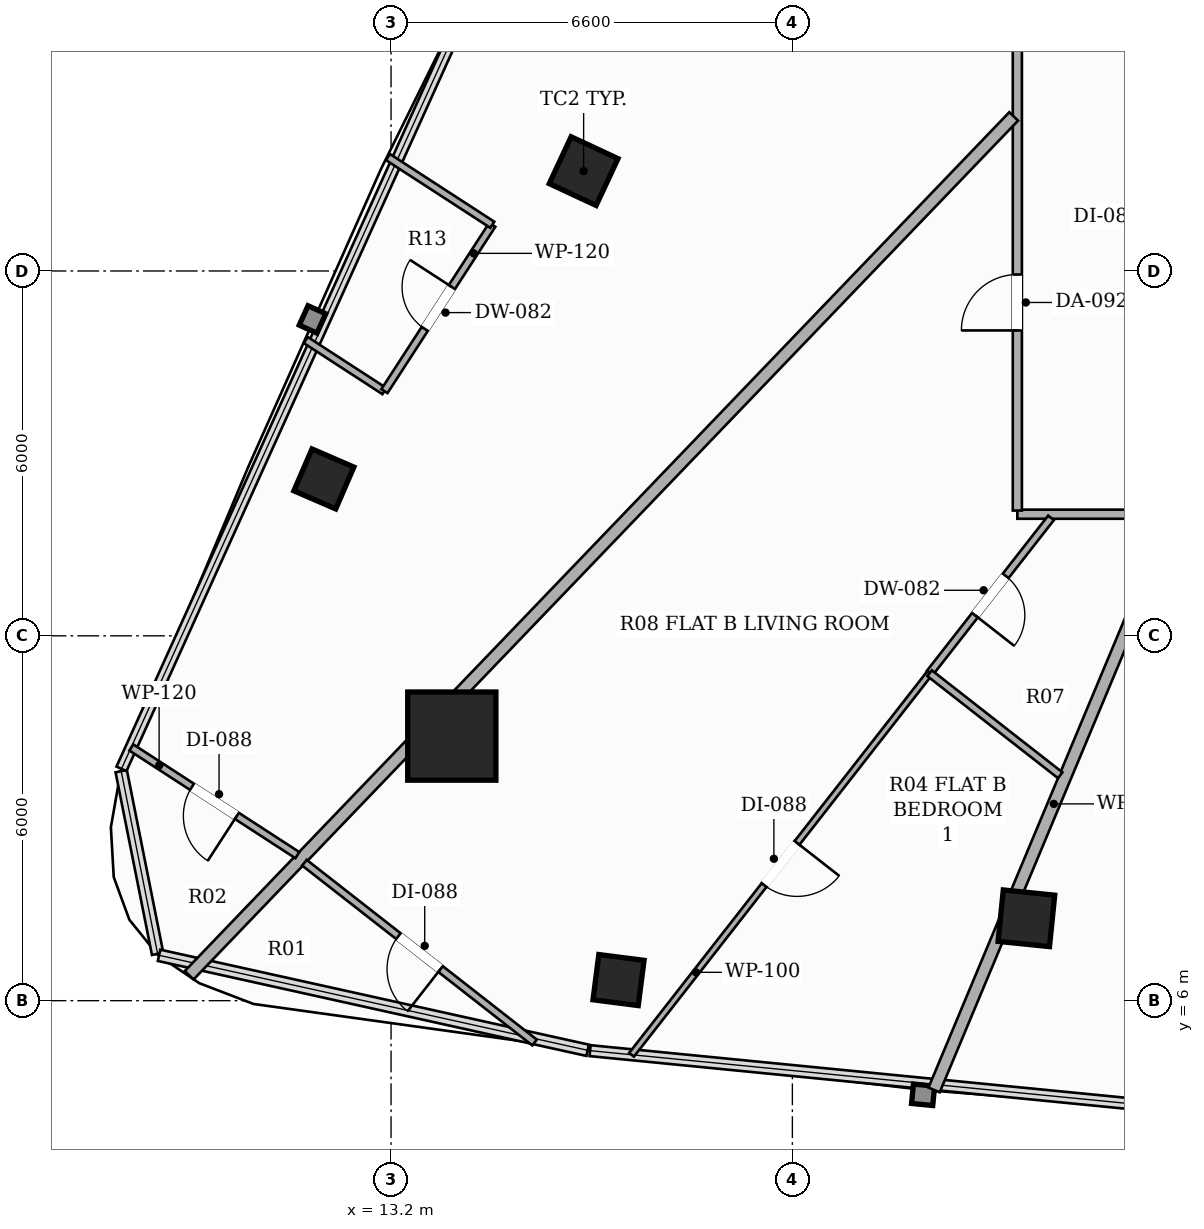
"""IFC4 building model, lengths in metres.
Left out: names, types, materials, properties, quantities, classifications, styles, units other than length and angle.
Written with IfcOpenShell. Run it as: python <this file> out.ifc"""

import sys

from ifc_helpers import new_model, si_unit, direction, frame, frame_2d, origin, origin_2d, place, context, subcontext, project, spatial, rectangle, hollow_rectangle, extrude, element, fill, save


model = new_model("IFC4")
c1 = context("Model", 3, precision=1e-05, world=origin(), true_north=direction((0.0, 1.0)))
c2 = subcontext(c1, "Body", "Model", "MODEL_VIEW")
j1 = project(units=[si_unit("LENGTHUNIT", "METRE"), si_unit("PLANEANGLEUNIT", "RADIAN")], contexts=[c1])
p1 = place(None, origin())
s1 = spatial("IfcSite", under=j1, at=p1, CompositionType="ELEMENT")
p2 = place(p1, origin())
s2 = spatial("IfcBuilding", under=s1, at=p2, CompositionType="ELEMENT")
p3 = place(p2, frame((0.0, 0.0, 180.35)))
s3 = spatial("IfcBuildingStorey", under=s2, at=p3, CompositionType="ELEMENT", Elevation=180.35)
p4 = place(p3, frame((14.199, 10.351, 0.0), z_axis=(0.0, 0.0, 1.0), x_axis=(1.0, 0.0, 0.0)))
e1 = element("IfcColumn", 1, at=p4, inside=s3, PredefinedType="COLUMN", context=c2, shape_type="SweptSolid", body=[
    extrude(hollow_rectangle(XDim=1.45, YDim=1.45, WallThickness=0.045, at=origin_2d()), origin(), (0.0, 0.0, 1.0), 3.3),
])
for number, where, z_axis, x_axis in (
    (2, (16.367, 19.642, 0.0), (0.0, 0.0, 1.0), (0.423, 0.906, 0.0)),
    (3, (23.649, 7.355, 0.0), (0.0, 0.0, 1.0), (-0.995, 0.101, 0.0)),
):
    element("IfcColumn", number, at=place(p3, frame(where, z_axis=z_axis, x_axis=x_axis)), inside=s3, PredefinedType="COLUMN", context=c2, shape_type="SweptSolid", body=[
        extrude(hollow_rectangle(XDim=0.85, YDim=0.85, WallThickness=0.028, at=origin_2d()), origin(), (0.0, 0.0, 1.0), 3.3),
    ])
for number, where, z_axis, x_axis in (
    (4, (12.095, 14.58, 0.0), (0.0, 0.0, 1.0), (0.397, 0.918, 0.0)),
    (5, (16.941, 6.339, 0.0), (0.0, 0.0, 1.0), (-0.992, 0.127, 0.0)),
):
    element("IfcColumn", number, at=place(p3, frame(where, z_axis=z_axis, x_axis=x_axis)), inside=s3, PredefinedType="COLUMN", context=c2, shape_type="SweptSolid", body=[
        extrude(hollow_rectangle(XDim=0.75, YDim=0.75, WallThickness=0.025, at=origin_2d()), origin(), (0.0, 0.0, 1.0), 3.3),
    ])
p5 = place(p3, frame((26.09, 14.0, 0.0), z_axis=(0.0, 0.0, 1.0), x_axis=(-1.0, 0.0, 0.0)))
e6 = element("IfcWall", 6, at=p5, inside=s3, PredefinedType="PARTITIONING", context=c2, shape_type="SweptSolid", body=[
    extrude(rectangle(XDim=2.59, YDim=0.15, at=frame_2d((1.295, 0.0))), origin(), (0.0, 0.0, 1.0), 2.721),
])
p6 = place(p3, frame((23.5, 14.06, 0.0), z_axis=(0.0, 0.0, 1.0), x_axis=(0.0, 1.0, 0.0)))
e7 = element("IfcWall", 7, at=p6, inside=s3, PredefinedType="PARTITIONING", context=c2, shape_type="SweptSolid", body=[
    extrude(rectangle(XDim=23.181, YDim=0.15, at=frame_2d((11.59, 0.0))), origin(), (0.0, 0.0, 1.0), 2.413),
])
p7 = place(p6, frame((14.184, 0.0, 0.0)))
e8 = element("IfcOpeningElement", 8, at=p7, cuts=e7, PredefinedType="OPENING", context=c2, shape_type="SweptSolid", body=[
    extrude(rectangle(XDim=0.92, YDim=2.15, at=frame_2d((0.46, 1.075))), frame((0.0, 0.085, 0.0), z_axis=(0.0, -1.0, 0.0), x_axis=(1.0, 0.0, 0.0)), (0.0, 0.0, 1.0), 0.17),
])
p8 = place(p6, frame((2.962, 0.0, 0.0)))
e9 = element("IfcOpeningElement", 9, at=p8, cuts=e7, PredefinedType="OPENING", context=c2, shape_type="SweptSolid", body=[
    extrude(rectangle(XDim=0.92, YDim=2.15, at=frame_2d((0.46, 1.075))), frame((0.0, 0.085, 0.0), z_axis=(0.0, -1.0, 0.0), x_axis=(1.0, 0.0, 0.0)), (0.0, 0.0, 1.0), 0.17),
])
p9 = place(p3, frame((22.131, 4.532, 0.0), z_axis=(0.0, 0.0, 1.0), x_axis=(0.38611914038, 0.922448919687, 0.0)))
e10 = element("IfcWall", 10, at=p9, inside=s3, PredefinedType="PARTITIONING", context=c2, shape_type="SweptSolid", body=[
    extrude(rectangle(XDim=10.199, YDim=0.2, at=frame_2d((5.1, 0.0))), origin(), (0.0, 0.0, 1.0), 2.413),
])
p10 = place(p3, frame((23.44, 20.542, 0.0), z_axis=(0.0, 0.0, 1.0), x_axis=(-0.692558302481, -0.721361904777, 0.0)))
e11 = element("IfcWall", 11, at=p10, inside=s3, PredefinedType="PARTITIONING", context=c2, shape_type="SweptSolid", body=[
    extrude(rectangle(XDim=19.58, YDim=0.2, at=frame_2d((9.79, 0.0))), origin(), (0.0, 0.0, 1.0), 2.413),
])
p11 = place(p3, frame((11.797, 16.864, 0.0), z_axis=(0.0, 0.0, 1.0), x_axis=(0.838732745172, -0.544543278516, 0.0)))
e12 = element("IfcWall", 12, at=p11, inside=s3, PredefinedType="PARTITIONING", context=c2, shape_type="SweptSolid", body=[
    extrude(rectangle(XDim=1.543, YDim=0.12, at=frame_2d((0.771, 0.0))), origin(), (0.0, 0.0, 1.0), 2.413),
])
p12 = place(p3, frame((13.091, 16.024, 0.0), z_axis=(0.0, 0.0, 1.0), x_axis=(0.544011633561, 0.839077673729, 0.0)))
e13 = element("IfcWall", 13, at=p12, inside=s3, PredefinedType="PARTITIONING", context=c2, shape_type="SweptSolid", body=[
    extrude(rectangle(XDim=3.261, YDim=0.12, at=frame_2d((1.63, 0.0))), origin(), (0.0, 0.0, 1.0), 2.413),
])
p13 = place(p12, frame((1.22, 0.0, 0.0)))
e14 = element("IfcOpeningElement", 14, at=p13, cuts=e13, PredefinedType="OPENING", context=c2, shape_type="SweptSolid", body=[
    extrude(rectangle(XDim=0.82, YDim=2.1, at=frame_2d((0.41, 1.05))), frame((0.0, 0.07, 0.0), z_axis=(0.0, -1.0, 0.0), x_axis=(1.0, 0.0, 0.0)), (0.0, 0.0, 1.0), 0.14),
])
p14 = place(p3, frame((14.865, 18.76, 0.0), z_axis=(0.0, 0.0, 1.0), x_axis=(-0.838903880254, 0.544279596986, 0.0)))
e15 = element("IfcWall", 15, at=p14, inside=s3, PredefinedType="PARTITIONING", context=c2, shape_type="SweptSolid", body=[
    extrude(rectangle(XDim=2.047, YDim=0.12, at=frame_2d((1.023, 0.0))), origin(), (0.0, 0.0, 1.0), 3.06),
])
p15 = place(p3, frame((11.659, 8.393, 0.0), z_axis=(0.0, 0.0, 1.0), x_axis=(-0.838933513053, 0.544233920916, 0.0)))
e16 = element("IfcWall", 16, at=p15, inside=s3, PredefinedType="PARTITIONING", context=c2, shape_type="SweptSolid", body=[
    extrude(rectangle(XDim=3.254, YDim=0.12, at=frame_2d((1.627, 0.0))), origin(), (0.0, 0.0, 1.0), 3.06),
])
p16 = place(p15, frame((1.186, 0.0, 0.0)))
e17 = element("IfcOpeningElement", 17, at=p16, cuts=e16, PredefinedType="OPENING", context=c2, shape_type="SweptSolid", body=[
    extrude(rectangle(XDim=0.88, YDim=2.1, at=frame_2d((0.44, 1.05))), frame((0.0, 0.07, 0.0), z_axis=(0.0, -1.0, 0.0), x_axis=(1.0, 0.0, 0.0)), (0.0, 0.0, 1.0), 0.14),
])
p17 = place(p3, frame((24.054, 13.94, 0.0), z_axis=(0.0, 0.0, 1.0), x_axis=(-0.615841255229, -0.787870261121, 0.0)))
e18 = element("IfcWall", 18, at=p17, inside=s3, PredefinedType="PARTITIONING", context=c2, shape_type="SweptSolid", body=[
    extrude(rectangle(XDim=3.243, YDim=0.12, at=frame_2d((1.622, 0.0))), origin(), (0.0, 0.0, 1.0), 2.721),
])
p18 = place(p17, frame((1.211, 0.0, 0.0)))
e19 = element("IfcOpeningElement", 19, at=p18, cuts=e18, PredefinedType="OPENING", context=c2, shape_type="SweptSolid", body=[
    extrude(rectangle(XDim=0.82, YDim=2.1, at=frame_2d((0.41, 1.05))), frame((0.0, 0.07, 0.0), z_axis=(0.0, -1.0, 0.0), x_axis=(1.0, 0.0, 0.0)), (0.0, 0.0, 1.0), 0.14),
])
p19 = place(p3, frame((15.56, 5.312, 0.0), z_axis=(0.0, 0.0, 1.0), x_axis=(-0.788036702969, 0.615628260214, 0.0)))
e20 = element("IfcWall", 20, at=p19, inside=s3, PredefinedType="PARTITIONING", context=c2, shape_type="SweptSolid", body=[
    extrude(rectangle(XDim=4.803, YDim=0.12, at=frame_2d((2.402, 0.0))), origin(), (0.0, 0.0, 1.0), 3.06),
])
p20 = place(p19, frame((1.962, 0.0, 0.0)))
e21 = element("IfcOpeningElement", 21, at=p20, cuts=e20, PredefinedType="OPENING", context=c2, shape_type="SweptSolid", body=[
    extrude(rectangle(XDim=0.88, YDim=2.1, at=frame_2d((0.44, 1.05))), frame((0.0, 0.07, 0.0), z_axis=(0.0, -1.0, 0.0), x_axis=(1.0, 0.0, 0.0)), (0.0, 0.0, 1.0), 0.14),
])
p21 = place(p3, frame((22.057, 11.385, 0.0), z_axis=(0.0, 0.0, 1.0), x_axis=(-0.61561191154, -0.78804947457, 0.0)))
e22 = element("IfcWall", 22, at=p21, inside=s3, PredefinedType="PARTITIONING", context=c2, shape_type="SweptSolid", body=[
    extrude(rectangle(XDim=7.963, YDim=0.1, at=frame_2d((3.981, 0.0))), origin(), (0.0, 0.0, 1.0), 2.413),
])
p22 = place(p21, frame((3.541, 0.0, 0.0)))
e23 = element("IfcOpeningElement", 23, at=p22, cuts=e22, PredefinedType="OPENING", context=c2, shape_type="SweptSolid", body=[
    extrude(rectangle(XDim=0.88, YDim=2.1, at=frame_2d((0.44, 1.05))), frame((0.0, 0.06, 0.0), z_axis=(0.0, -1.0, 0.0), x_axis=(1.0, 0.0, 0.0)), (0.0, 0.0, 1.0), 0.12),
])
p23 = place(p3, frame((24.205, 9.707, 0.0), z_axis=(0.0, 0.0, 1.0), x_axis=(-0.788077327334, 0.615576255343, 0.0)))
e24 = element("IfcWall", 24, at=p23, inside=s3, PredefinedType="PARTITIONING", context=c2, shape_type="SweptSolid", body=[
    extrude(rectangle(XDim=2.726, YDim=0.12, at=frame_2d((1.363, 0.0))), origin(), (0.0, 0.0, 1.0), 2.721),
])
p24 = place(p13, origin())
e25 = element("IfcDoor", 25, at=p24, inside=s3, OperationType="SINGLE_SWING_RIGHT", PredefinedType="DOOR", context=c2, shape_type="SweptSolid", body=[
    extrude(rectangle(XDim=0.82, YDim=2.1, at=frame_2d((0.41, 1.05))), frame((0.0, 0.025, 0.0), z_axis=(0.0, -1.0, 0.0), x_axis=(1.0, 0.0, 0.0)), (0.0, 0.0, 1.0), 0.05),
])
fill(e14, e25)
p25 = place(p16, origin())
e26 = element("IfcDoor", 26, at=p25, inside=s3, OperationType="SINGLE_SWING_LEFT", PredefinedType="DOOR", context=c2, shape_type="SweptSolid", body=[
    extrude(rectangle(XDim=0.88, YDim=2.1, at=frame_2d((0.44, 1.05))), frame((0.0, 0.025, 0.0), z_axis=(0.0, -1.0, 0.0), x_axis=(1.0, 0.0, 0.0)), (0.0, 0.0, 1.0), 0.05),
])
fill(e17, e26)
p26 = place(p8, origin())
e27 = element("IfcDoor", 27, at=p26, inside=s3, OperationType="SINGLE_SWING_LEFT", PredefinedType="DOOR", context=c2, shape_type="SweptSolid", body=[
    extrude(rectangle(XDim=0.92, YDim=2.15, at=frame_2d((0.46, 1.075))), frame((0.0, 0.025, 0.0), z_axis=(0.0, -1.0, 0.0), x_axis=(1.0, 0.0, 0.0)), (0.0, 0.0, 1.0), 0.05),
])
fill(e9, e27)
p27 = place(p18, origin())
e28 = element("IfcDoor", 28, at=p27, inside=s3, OperationType="SINGLE_SWING_RIGHT", PredefinedType="DOOR", context=c2, shape_type="SweptSolid", body=[
    extrude(rectangle(XDim=0.82, YDim=2.1, at=frame_2d((0.41, 1.05))), frame((0.0, 0.025, 0.0), z_axis=(0.0, -1.0, 0.0), x_axis=(1.0, 0.0, 0.0)), (0.0, 0.0, 1.0), 0.05),
])
fill(e19, e28)
p28 = place(p20, origin())
e29 = element("IfcDoor", 29, at=p28, inside=s3, OperationType="SINGLE_SWING_LEFT", PredefinedType="DOOR", context=c2, shape_type="SweptSolid", body=[
    extrude(rectangle(XDim=0.88, YDim=2.1, at=frame_2d((0.44, 1.05))), frame((0.0, 0.025, 0.0), z_axis=(0.0, -1.0, 0.0), x_axis=(1.0, 0.0, 0.0)), (0.0, 0.0, 1.0), 0.05),
])
fill(e21, e29)
p29 = place(p22, origin())
e30 = element("IfcDoor", 30, at=p29, inside=s3, OperationType="SINGLE_SWING_LEFT", PredefinedType="DOOR", context=c2, shape_type="SweptSolid", body=[
    extrude(rectangle(XDim=0.88, YDim=2.1, at=frame_2d((0.44, 1.05))), frame((0.0, 0.025, 0.0), z_axis=(0.0, -1.0, 0.0), x_axis=(1.0, 0.0, 0.0)), (0.0, 0.0, 1.0), 0.05),
])
fill(e23, e30)
save(model, sys.argv[1])
